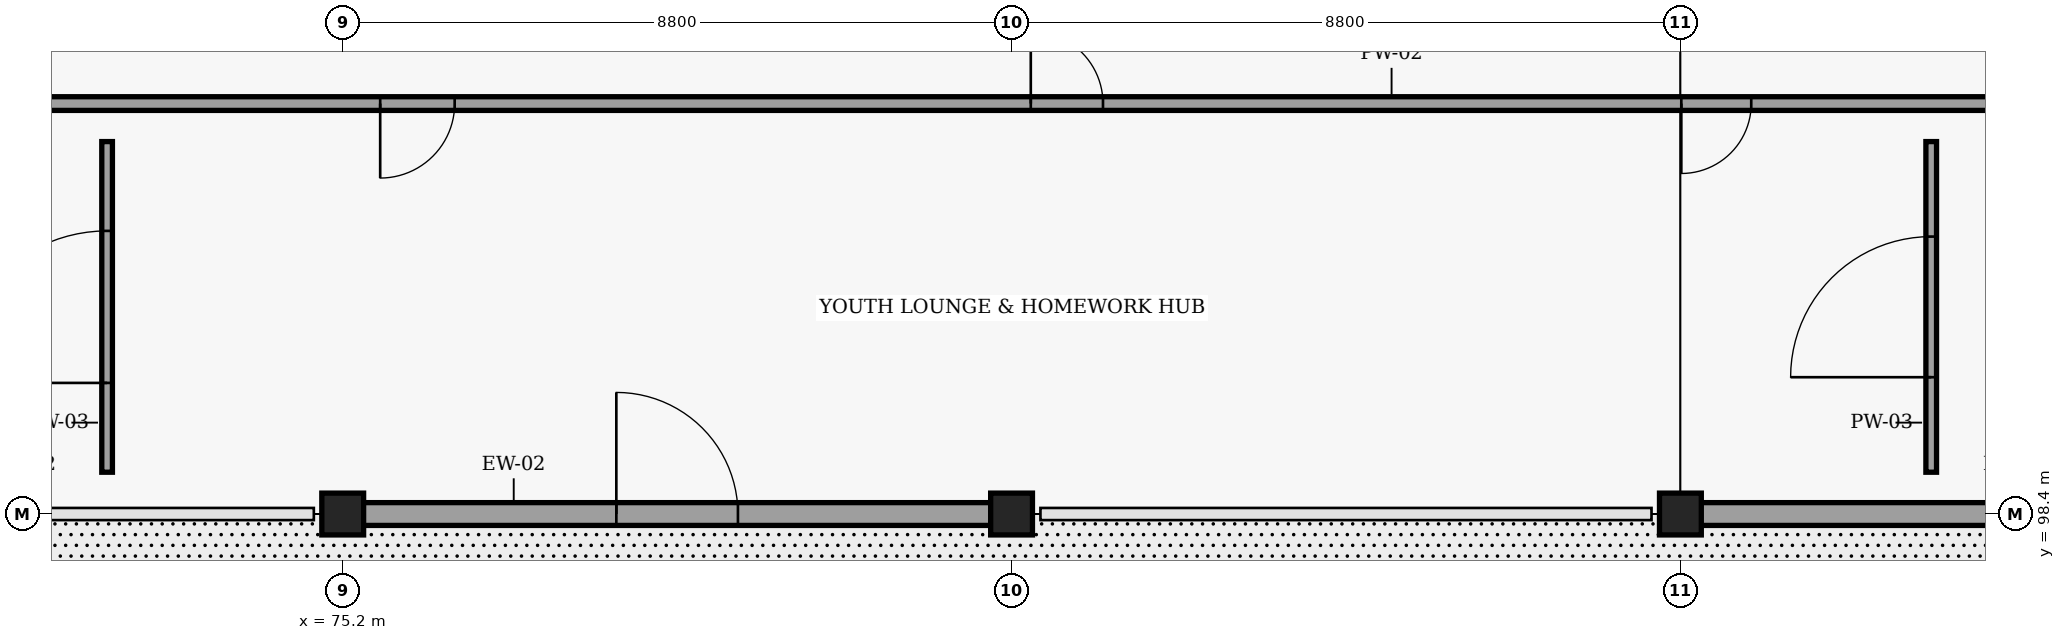
"""IFC4 building model, lengths in metres.
Left out: names, types, materials, properties, quantities, classifications, styles, units other than length and angle.
Written with IfcOpenShell. Run it as: python <this file> out.ifc"""

import sys

from ifc_helpers import new_model, si_unit, direction, frame, frame_2d, origin, origin_2d, place, context, subcontext, project, spatial, rectangle, extrude, element, fill, save


model = new_model("IFC4")
c1 = context("Model", 3, precision=1e-05, world=origin(), true_north=direction((0.0, 1.0)))
c2 = subcontext(c1, "Body", "Model", "MODEL_VIEW")
j1 = project(units=[si_unit("LENGTHUNIT", "METRE"), si_unit("PLANEANGLEUNIT", "RADIAN")], contexts=[c1])
p1 = place(None, origin())
s1 = spatial("IfcSite", under=j1, at=p1, CompositionType="ELEMENT")
p2 = place(p1, origin())
s2 = spatial("IfcBuilding", under=s1, at=p2, CompositionType="ELEMENT")
p3 = place(p2, frame((0.0, 0.0, 16.5)))
s3 = spatial("IfcBuildingStorey", under=s2, at=p3, CompositionType="ELEMENT", Elevation=16.5)
for number, where, z_axis, x_axis in (
    (1, (75.2, 98.4, 0.0), (0.0, 0.0, 1.0), (1.0, 0.0, 0.0)),
    (2, (84.0, 98.4, 0.0), (0.0, 0.0, 1.0), (1.0, 0.0, 0.0)),
    (3, (92.8, 98.4, 0.0), (0.0, 0.0, 1.0), (1.0, 0.0, 0.0)),
):
    element("IfcColumn", number, at=place(p3, frame(where, z_axis=z_axis, x_axis=x_axis)), inside=s3, PredefinedType="COLUMN", context=c2, shape_type="SweptSolid", body=[
        extrude(rectangle(XDim=0.55, YDim=0.55, at=origin_2d()), origin(), (0.0, 0.0, 1.0), 3.6),
    ])
p4 = place(p3, frame((75.3, 98.4, 0.0), z_axis=(0.0, 0.0, 1.0), x_axis=(1.0, 0.0, 0.0)))
e4 = element("IfcWall", 4, at=p4, inside=s3, PredefinedType="SOLIDWALL", context=c2, shape_type="SweptSolid", body=[
    extrude(rectangle(XDim=8.6, YDim=0.3, at=frame_2d((4.3, 0.0))), origin(), (0.0, 0.0, 1.0), 2.885),
])
p5 = place(p4, frame((3.5, 0.0, 0.0)))
e5 = element("IfcOpeningElement", 5, at=p5, cuts=e4, PredefinedType="OPENING", context=c2, shape_type="SweptSolid", body=[
    extrude(rectangle(XDim=1.6, YDim=2.2, at=frame_2d((0.8, 1.1))), frame((0.0, 0.16, 0.0), z_axis=(0.0, -1.0, 0.0), x_axis=(1.0, 0.0, 0.0)), (0.0, 0.0, 1.0), 0.32),
])
p6 = place(p3, frame((92.9, 98.4, 0.0), z_axis=(0.0, 0.0, 1.0), x_axis=(1.0, 0.0, 0.0)))
e6 = element("IfcWall", 6, at=p6, inside=s3, PredefinedType="SOLIDWALL", context=c2, shape_type="SweptSolid", body=[
    extrude(rectangle(XDim=8.6, YDim=0.3, at=frame_2d((4.3, 0.0))), origin(), (0.0, 0.0, 1.0), 2.885),
])
p7 = place(p6, frame((6.45, 0.0, 0.0)))
e7 = element("IfcOpeningElement", 7, at=p7, cuts=e6, PredefinedType="OPENING", context=c2, shape_type="SweptSolid", body=[
    extrude(rectangle(XDim=1.6, YDim=2.2, at=frame_2d((0.8, 1.1))), frame((0.0, 0.16, 0.0), z_axis=(0.0, -1.0, 0.0), x_axis=(1.0, 0.0, 0.0)), (0.0, 0.0, 1.0), 0.32),
])
p8 = place(p3, frame((50.55, 103.8, 0.0), z_axis=(0.0, 0.0, 1.0), x_axis=(1.0, 0.0, 0.0)))
e8 = element("IfcWall", 8, at=p8, inside=s3, PredefinedType="PARTITIONING", context=c2, shape_type="SweptSolid", body=[
    extrude(rectangle(XDim=76.9, YDim=0.18, at=frame_2d((38.45, 0.0))), origin(), (0.0, 0.0, 1.0), 2.715),
])
p9 = place(p8, frame((8.014, 0.0, 0.0)))
e9 = element("IfcOpeningElement", 9, at=p9, cuts=e8, PredefinedType="OPENING", context=c2, shape_type="SweptSolid", body=[
    extrude(rectangle(XDim=1.06, YDim=2.16, at=frame_2d((0.53, 1.08))), frame((0.0, 0.1, 0.0), z_axis=(0.0, -1.0, 0.0), x_axis=(1.0, 0.0, 0.0)), (0.0, 0.0, 1.0), 0.2),
])
p10 = place(p8, frame((16.589, 0.0, 0.0)))
e10 = element("IfcOpeningElement", 10, at=p10, cuts=e8, PredefinedType="OPENING", context=c2, shape_type="SweptSolid", body=[
    extrude(rectangle(XDim=1.0, YDim=2.14, at=frame_2d((0.5, 1.07))), frame((0.0, 0.1, 0.0), z_axis=(0.0, -1.0, 0.0), x_axis=(1.0, 0.0, 0.0)), (0.0, 0.0, 1.0), 0.2),
])
p11 = place(p8, frame((25.143, 0.0, 0.0)))
e11 = element("IfcOpeningElement", 11, at=p11, cuts=e8, PredefinedType="OPENING", context=c2, shape_type="SweptSolid", body=[
    extrude(rectangle(XDim=0.98, YDim=2.12, at=frame_2d((0.49, 1.06))), frame((0.0, 0.1, 0.0), z_axis=(0.0, -1.0, 0.0), x_axis=(1.0, 0.0, 0.0)), (0.0, 0.0, 1.0), 0.2),
])
p12 = place(p8, frame((33.703, 0.0, 0.0)))
e12 = element("IfcOpeningElement", 12, at=p12, cuts=e8, PredefinedType="OPENING", context=c2, shape_type="SweptSolid", body=[
    extrude(rectangle(XDim=0.95, YDim=2.12, at=frame_2d((0.475, 1.06))), frame((0.0, 0.1, 0.0), z_axis=(0.0, -1.0, 0.0), x_axis=(1.0, 0.0, 0.0)), (0.0, 0.0, 1.0), 0.2),
])
p13 = place(p8, frame((42.262, 0.0, 0.0)))
e13 = element("IfcOpeningElement", 13, at=p13, cuts=e8, PredefinedType="OPENING", context=c2, shape_type="SweptSolid", body=[
    extrude(rectangle(XDim=0.92, YDim=2.1, at=frame_2d((0.46, 1.05))), frame((0.0, 0.1, 0.0), z_axis=(0.0, -1.0, 0.0), x_axis=(1.0, 0.0, 0.0)), (0.0, 0.0, 1.0), 0.2),
])
p14 = place(p8, frame((50.787, 0.0, 0.0)))
e14 = element("IfcOpeningElement", 14, at=p14, cuts=e8, PredefinedType="OPENING", context=c2, shape_type="SweptSolid", body=[
    extrude(rectangle(XDim=0.96, YDim=2.08, at=frame_2d((0.48, 1.04))), frame((0.0, 0.1, 0.0), z_axis=(0.0, -1.0, 0.0), x_axis=(1.0, 0.0, 0.0)), (0.0, 0.0, 1.0), 0.2),
])
p15 = place(p8, frame((59.361, 0.0, 0.0)))
e15 = element("IfcOpeningElement", 15, at=p15, cuts=e8, PredefinedType="OPENING", context=c2, shape_type="SweptSolid", body=[
    extrude(rectangle(XDim=0.9, YDim=2.06, at=frame_2d((0.45, 1.03))), frame((0.0, 0.1, 0.0), z_axis=(0.0, -1.0, 0.0), x_axis=(1.0, 0.0, 0.0)), (0.0, 0.0, 1.0), 0.2),
])
p16 = place(p8, frame((67.766, 0.0, 0.0)))
e16 = element("IfcOpeningElement", 16, at=p16, cuts=e8, PredefinedType="OPENING", context=c2, shape_type="SweptSolid", body=[
    extrude(rectangle(XDim=1.18, YDim=2.18, at=frame_2d((0.59, 1.09))), frame((0.0, 0.1, 0.0), z_axis=(0.0, -1.0, 0.0), x_axis=(1.0, 0.0, 0.0)), (0.0, 0.0, 1.0), 0.2),
])
p17 = place(p3, frame((72.1, 98.95, 0.0), z_axis=(0.0, 0.0, 1.0), x_axis=(0.0, 1.0, 0.0)))
e17 = element("IfcWall", 17, at=p17, inside=s3, PredefinedType="PARTITIONING", context=c2, shape_type="SweptSolid", body=[
    extrude(rectangle(XDim=4.35, YDim=0.14, at=frame_2d((2.175, 0.0))), origin(), (0.0, 0.0, 1.0), 2.845),
])
p18 = place(p17, frame((1.175, 0.0, 0.0)))
e18 = element("IfcOpeningElement", 18, at=p18, cuts=e17, PredefinedType="OPENING", context=c2, shape_type="SweptSolid", body=[
    extrude(rectangle(XDim=2.0, YDim=2.3, at=frame_2d((1.0, 1.15))), frame((0.0, 0.08, 0.0), z_axis=(0.0, -1.0, 0.0), x_axis=(1.0, 0.0, 0.0)), (0.0, 0.0, 1.0), 0.16),
])
p19 = place(p3, frame((96.1, 98.95, 0.0), z_axis=(0.0, 0.0, 1.0), x_axis=(0.0, 1.0, 0.0)))
e19 = element("IfcWall", 19, at=p19, inside=s3, PredefinedType="PARTITIONING", context=c2, shape_type="SweptSolid", body=[
    extrude(rectangle(XDim=4.35, YDim=0.14, at=frame_2d((2.175, 0.0))), origin(), (0.0, 0.0, 1.0), 3.365),
])
p20 = place(p19, frame((1.25, 0.0, 0.0)))
e20 = element("IfcOpeningElement", 20, at=p20, cuts=e19, PredefinedType="OPENING", context=c2, shape_type="SweptSolid", body=[
    extrude(rectangle(XDim=1.85, YDim=2.22, at=frame_2d((0.925, 1.11))), frame((0.0, 0.08, 0.0), z_axis=(0.0, -1.0, 0.0), x_axis=(1.0, 0.0, 0.0)), (0.0, 0.0, 1.0), 0.16),
])
p21 = place(p5, origin())
e21 = element("IfcDoor", 21, at=p21, inside=s3, OperationType="DOUBLE_DOOR_SINGLE_SWING", PredefinedType="DOOR", context=c2, shape_type="SweptSolid", body=[
    extrude(rectangle(XDim=1.6, YDim=2.2, at=frame_2d((0.8, 1.1))), frame((0.0, 0.025, 0.0), z_axis=(0.0, -1.0, 0.0), x_axis=(1.0, 0.0, 0.0)), (0.0, 0.0, 1.0), 0.05),
])
fill(e5, e21)
p22 = place(p11, origin())
e22 = element("IfcDoor", 22, at=p22, inside=s3, OperationType="SINGLE_SWING_RIGHT", PredefinedType="DOOR", context=c2, shape_type="SweptSolid", body=[
    extrude(rectangle(XDim=0.98, YDim=2.12, at=frame_2d((0.49, 1.06))), frame((0.0, 0.025, 0.0), z_axis=(0.0, -1.0, 0.0), x_axis=(1.0, 0.0, 0.0)), (0.0, 0.0, 1.0), 0.05),
])
fill(e11, e22)
p23 = place(p12, origin())
e23 = element("IfcDoor", 23, at=p23, inside=s3, OperationType="SINGLE_SWING_LEFT", PredefinedType="DOOR", context=c2, shape_type="SweptSolid", body=[
    extrude(rectangle(XDim=0.95, YDim=2.12, at=frame_2d((0.475, 1.06))), frame((0.0, 0.025, 0.0), z_axis=(0.0, -1.0, 0.0), x_axis=(1.0, 0.0, 0.0)), (0.0, 0.0, 1.0), 0.05),
])
fill(e12, e23)
p24 = place(p13, origin())
e24 = element("IfcDoor", 24, at=p24, inside=s3, OperationType="SINGLE_SWING_RIGHT", PredefinedType="DOOR", context=c2, shape_type="SweptSolid", body=[
    extrude(rectangle(XDim=0.92, YDim=2.1, at=frame_2d((0.46, 1.05))), frame((0.0, 0.025, 0.0), z_axis=(0.0, -1.0, 0.0), x_axis=(1.0, 0.0, 0.0)), (0.0, 0.0, 1.0), 0.05),
])
fill(e13, e24)
p25 = place(p18, origin())
e25 = element("IfcDoor", 25, at=p25, inside=s3, OperationType="DOUBLE_DOOR_SINGLE_SWING", PredefinedType="DOOR", context=c2, shape_type="SweptSolid", body=[
    extrude(rectangle(XDim=2.0, YDim=2.3, at=frame_2d((1.0, 1.15))), frame((0.0, 0.025, 0.0), z_axis=(0.0, -1.0, 0.0), x_axis=(1.0, 0.0, 0.0)), (0.0, 0.0, 1.0), 0.05),
])
fill(e18, e25)
p26 = place(p20, origin())
e26 = element("IfcDoor", 26, at=p26, inside=s3, OperationType="DOUBLE_DOOR_SINGLE_SWING", PredefinedType="DOOR", context=c2, shape_type="SweptSolid", body=[
    extrude(rectangle(XDim=1.85, YDim=2.22, at=frame_2d((0.925, 1.11))), frame((0.0, 0.025, 0.0), z_axis=(0.0, -1.0, 0.0), x_axis=(1.0, 0.0, 0.0)), (0.0, 0.0, 1.0), 0.05),
])
fill(e20, e26)
save(model, sys.argv[1])
